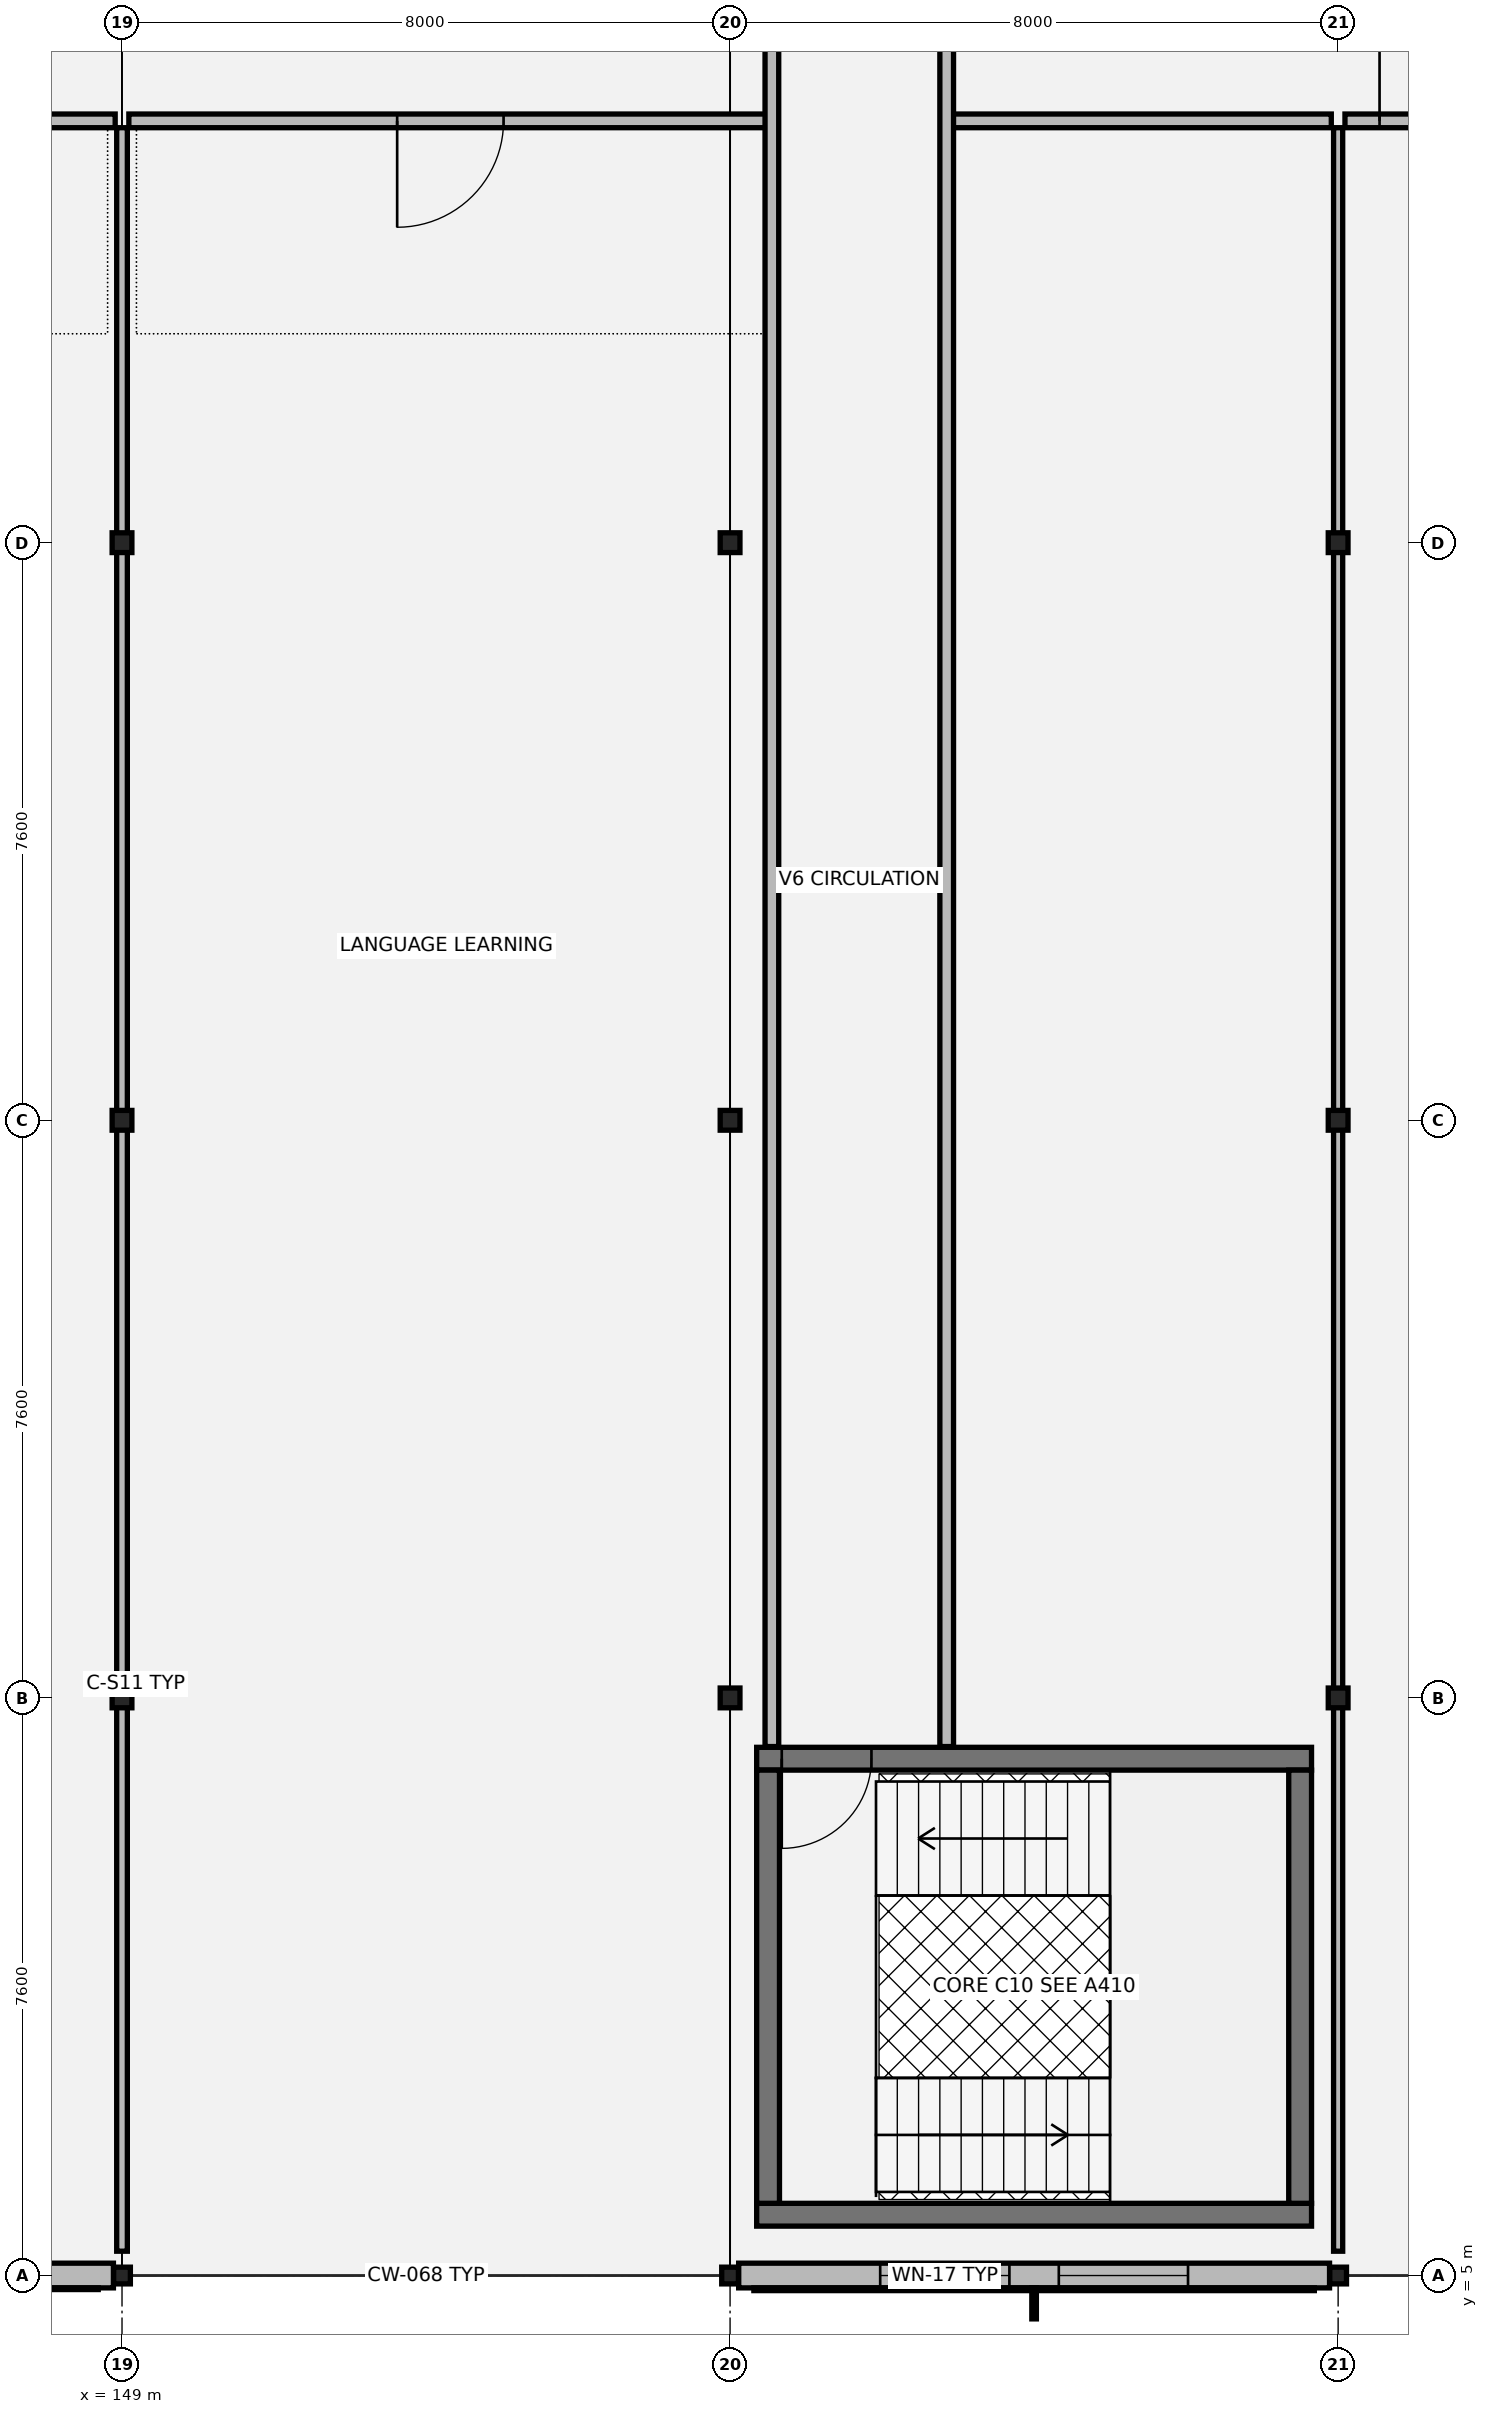
"""IFC4 building model, lengths in metres.
Left out: names, types, materials, properties, quantities, classifications, styles, units other than length and angle.
Written with IfcOpenShell. Run it as: python <this file> out.ifc"""

import sys

from ifc_helpers import new_model, si_unit, direction, frame, frame_2d, origin, origin_2d, place, context, subcontext, project, spatial, rectangle, hollow_rectangle, i_section, extrude, element, fill, save


model = new_model("IFC4")
c1 = context("Model", 3, precision=1e-05, world=origin(), true_north=direction((0.0, 1.0)))
c2 = subcontext(c1, "Body", "Model", "MODEL_VIEW")
j1 = project(units=[si_unit("LENGTHUNIT", "METRE"), si_unit("PLANEANGLEUNIT", "RADIAN")], contexts=[c1])
p1 = place(None, origin())
s1 = spatial("IfcSite", under=j1, at=p1, CompositionType="ELEMENT")
p2 = place(p1, origin())
s2 = spatial("IfcBuilding", under=s1, at=p2, CompositionType="ELEMENT")
p3 = place(p2, frame((0.0, 0.0, 13.26)))
s3 = spatial("IfcBuildingStorey", under=s2, at=p3, CompositionType="ELEMENT", Elevation=13.26)
p4 = place(p3, frame((149.0, 5.0, 0.0), z_axis=(0.0, 0.0, 1.0), x_axis=(1.0, 0.0, 0.0)))
e1 = element("IfcColumn", 1, at=p4, inside=s3, PredefinedType="COLUMN", context=c2, shape_type="SweptSolid", body=[
    extrude(hollow_rectangle(XDim=0.22, YDim=0.22, WallThickness=0.01, at=origin_2d()), origin(), (0.0, 0.0, 1.0), 4.055),
])
for number, where, z_axis, x_axis in (
    (2, (149.0, 12.6, 0.0), (0.0, 0.0, 1.0), (1.0, 0.0, 0.0)),
    (3, (149.0, 20.2, 0.0), (0.0, 0.0, 1.0), (1.0, 0.0, 0.0)),
    (4, (149.0, 27.8, 0.0), (0.0, 0.0, 1.0), (1.0, 0.0, 0.0)),
):
    element("IfcColumn", number, at=place(p3, frame(where, z_axis=z_axis, x_axis=x_axis)), inside=s3, PredefinedType="COLUMN", context=c2, shape_type="SweptSolid", body=[
        extrude(i_section(OverallWidth=0.26, OverallDepth=0.26, WebThickness=0.01, FlangeThickness=0.018, at=origin_2d()), origin(), (0.0, 0.0, 1.0), 4.055),
    ])
p5 = place(p3, frame((157.0, 5.0, 0.0), z_axis=(0.0, 0.0, 1.0), x_axis=(1.0, 0.0, 0.0)))
e5 = element("IfcColumn", 5, at=p5, inside=s3, PredefinedType="COLUMN", context=c2, shape_type="SweptSolid", body=[
    extrude(hollow_rectangle(XDim=0.22, YDim=0.22, WallThickness=0.01, at=origin_2d()), origin(), (0.0, 0.0, 1.0), 4.055),
])
for number, where, z_axis, x_axis in (
    (6, (157.0, 12.6, 0.0), (0.0, 0.0, 1.0), (1.0, 0.0, 0.0)),
    (7, (157.0, 20.2, 0.0), (0.0, 0.0, 1.0), (1.0, 0.0, 0.0)),
    (8, (157.0, 27.8, 0.0), (0.0, 0.0, 1.0), (1.0, 0.0, 0.0)),
):
    element("IfcColumn", number, at=place(p3, frame(where, z_axis=z_axis, x_axis=x_axis)), inside=s3, PredefinedType="COLUMN", context=c2, shape_type="SweptSolid", body=[
        extrude(i_section(OverallWidth=0.26, OverallDepth=0.26, WebThickness=0.01, FlangeThickness=0.018, at=origin_2d()), origin(), (0.0, 0.0, 1.0), 4.055),
    ])
p6 = place(p3, frame((165.0, 5.0, 0.0), z_axis=(0.0, 0.0, 1.0), x_axis=(1.0, 0.0, 0.0)))
e9 = element("IfcColumn", 9, at=p6, inside=s3, PredefinedType="COLUMN", context=c2, shape_type="SweptSolid", body=[
    extrude(hollow_rectangle(XDim=0.22, YDim=0.22, WallThickness=0.01, at=origin_2d()), origin(), (0.0, 0.0, 1.0), 4.055),
])
for number, where, z_axis, x_axis in (
    (10, (165.0, 12.6, 0.0), (0.0, 0.0, 1.0), (1.0, 0.0, 0.0)),
    (11, (165.0, 20.2, 0.0), (0.0, 0.0, 1.0), (1.0, 0.0, 0.0)),
    (12, (165.0, 27.8, 0.0), (0.0, 0.0, 1.0), (1.0, 0.0, 0.0)),
):
    element("IfcColumn", number, at=place(p3, frame(where, z_axis=z_axis, x_axis=x_axis)), inside=s3, PredefinedType="COLUMN", context=c2, shape_type="SweptSolid", body=[
        extrude(i_section(OverallWidth=0.26, OverallDepth=0.26, WebThickness=0.01, FlangeThickness=0.018, at=origin_2d()), origin(), (0.0, 0.0, 1.0), 4.055),
    ])
p7 = place(p3, frame((141.113, 5.0, 0.0), z_axis=(0.0, 0.0, 1.0), x_axis=(1.0, 0.0, 0.0)))
e13 = element("IfcWall", 13, at=p7, inside=s3, PredefinedType="SOLIDWALL", context=c2, shape_type="SweptSolid", body=[
    extrude(rectangle(XDim=7.774, YDim=0.325, at=frame_2d((3.887, 0.0))), origin(), (0.0, 0.0, 1.0), 3.48),
])
p8 = place(p7, frame((1.942, 0.0, 0.8)))
e14 = element("IfcOpeningElement", 14, at=p8, cuts=e13, PredefinedType="OPENING", context=c2, shape_type="SweptSolid", body=[
    extrude(rectangle(XDim=1.62, YDim=2.06, at=frame_2d((0.81, 1.03))), frame((0.0, 0.172, 0.0), z_axis=(0.0, -1.0, 0.0), x_axis=(1.0, 0.0, 0.0)), (0.0, 0.0, 1.0), 0.345),
])
p9 = place(p7, frame((4.212, 0.0, 0.8)))
e15 = element("IfcOpeningElement", 15, at=p9, cuts=e13, PredefinedType="OPENING", context=c2, shape_type="SweptSolid", body=[
    extrude(rectangle(XDim=1.62, YDim=2.06, at=frame_2d((0.81, 1.03))), frame((0.0, 0.172, 0.0), z_axis=(0.0, -1.0, 0.0), x_axis=(1.0, 0.0, 0.0)), (0.0, 0.0, 1.0), 0.345),
])
p10 = place(p3, frame((157.113, 5.0, 0.0), z_axis=(0.0, 0.0, 1.0), x_axis=(1.0, 0.0, 0.0)))
e16 = element("IfcWall", 16, at=p10, inside=s3, PredefinedType="SOLIDWALL", context=c2, shape_type="SweptSolid", body=[
    extrude(rectangle(XDim=7.774, YDim=0.325, at=frame_2d((3.887, 0.0))), origin(), (0.0, 0.0, 1.0), 3.48),
])
p11 = place(p10, frame((1.862, 0.0, 0.8)))
e17 = element("IfcOpeningElement", 17, at=p11, cuts=e16, PredefinedType="OPENING", context=c2, shape_type="SweptSolid", body=[
    extrude(rectangle(XDim=1.7, YDim=2.2, at=frame_2d((0.85, 1.1))), frame((0.0, 0.172, 0.0), z_axis=(0.0, -1.0, 0.0), x_axis=(1.0, 0.0, 0.0)), (0.0, 0.0, 1.0), 0.345),
])
p12 = place(p10, frame((4.212, 0.0, 0.8)))
e18 = element("IfcOpeningElement", 18, at=p12, cuts=e16, PredefinedType="OPENING", context=c2, shape_type="SweptSolid", body=[
    extrude(rectangle(XDim=1.7, YDim=2.2, at=frame_2d((0.85, 1.1))), frame((0.0, 0.172, 0.0), z_axis=(0.0, -1.0, 0.0), x_axis=(1.0, 0.0, 0.0)), (0.0, 0.0, 1.0), 0.345),
])
p13 = place(p3, frame((157.35, 5.8, 0.0), z_axis=(0.0, 0.0, 1.0), x_axis=(1.0, 0.0, 0.0)))
e19 = element("IfcWall", 19, at=p13, inside=s3, PredefinedType="SHEAR", context=c2, shape_type="SweptSolid", body=[
    extrude(rectangle(XDim=7.3, YDim=0.3, at=frame_2d((3.65, 0.0))), origin(), (0.0, 0.0, 1.0), 3.845),
])
p14 = place(p3, frame((157.35, 11.8, 0.0), z_axis=(0.0, 0.0, 1.0), x_axis=(1.0, 0.0, 0.0)))
e20 = element("IfcWall", 20, at=p14, inside=s3, PredefinedType="SHEAR", context=c2, shape_type="SweptSolid", body=[
    extrude(rectangle(XDim=7.3, YDim=0.3, at=frame_2d((3.65, 0.0))), origin(), (0.0, 0.0, 1.0), 3.845),
])
p15 = place(p14, frame((0.33, 0.0, 0.0)))
e21 = element("IfcOpeningElement", 21, at=p15, cuts=e20, PredefinedType="OPENING", context=c2, shape_type="SweptSolid", body=[
    extrude(rectangle(XDim=1.18, YDim=2.18, at=frame_2d((0.59, 1.09))), frame((0.0, 0.16, 0.0), z_axis=(0.0, -1.0, 0.0), x_axis=(1.0, 0.0, 0.0)), (0.0, 0.0, 1.0), 0.32),
])
for number, where, z_axis, x_axis in (
    (22, (157.5, 5.95, 0.0), (0.0, 0.0, 1.0), (0.0, 1.0, 0.0)),
    (23, (164.5, 5.95, 0.0), (0.0, 0.0, 1.0), (0.0, 1.0, 0.0)),
):
    element("IfcWall", number, at=place(p3, frame(where, z_axis=z_axis, x_axis=x_axis)), inside=s3, PredefinedType="SHEAR", context=c2, shape_type="SweptSolid", body=[
        extrude(rectangle(XDim=5.7, YDim=0.3, at=frame_2d((2.85, 0.0))), origin(), (0.0, 0.0, 1.0), 3.845),
    ])
p16 = place(p3, frame((141.2, 33.35, 0.0), z_axis=(0.0, 0.0, 1.0), x_axis=(1.0, 0.0, 0.0)))
e24 = element("IfcWall", 24, at=p16, inside=s3, PredefinedType="PARTITIONING", context=c2, shape_type="SweptSolid", body=[
    extrude(rectangle(XDim=7.71, YDim=0.18, at=frame_2d((3.855, 0.0))), origin(), (0.0, 0.0, 1.0), 3.18),
])
p17 = place(p16, frame((3.055, 0.0, 0.0)))
e25 = element("IfcOpeningElement", 25, at=p17, cuts=e24, PredefinedType="OPENING", context=c2, shape_type="SweptSolid", body=[
    extrude(rectangle(XDim=1.6, YDim=2.25, at=frame_2d((0.8, 1.125))), frame((0.0, 0.1, 0.0), z_axis=(0.0, -1.0, 0.0), x_axis=(1.0, 0.0, 0.0)), (0.0, 0.0, 1.0), 0.2),
])
p18 = place(p3, frame((149.09, 33.35, 0.0), z_axis=(0.0, 0.0, 1.0), x_axis=(1.0, 0.0, 0.0)))
e26 = element("IfcWall", 26, at=p18, inside=s3, PredefinedType="PARTITIONING", context=c2, shape_type="SweptSolid", body=[
    extrude(rectangle(XDim=8.46, YDim=0.18, at=frame_2d((4.23, 0.0))), origin(), (0.0, 0.0, 1.0), 3.18),
])
p19 = place(p18, frame((3.53, 0.0, 0.0)))
e27 = element("IfcOpeningElement", 27, at=p19, cuts=e26, PredefinedType="OPENING", context=c2, shape_type="SweptSolid", body=[
    extrude(rectangle(XDim=1.4, YDim=2.22, at=frame_2d((0.7, 1.11))), frame((0.0, 0.1, 0.0), z_axis=(0.0, -1.0, 0.0), x_axis=(1.0, 0.0, 0.0)), (0.0, 0.0, 1.0), 0.2),
])
p20 = place(p3, frame((159.85, 33.35, 0.0), z_axis=(0.0, 0.0, 1.0), x_axis=(1.0, 0.0, 0.0)))
e28 = element("IfcWall", 28, at=p20, inside=s3, PredefinedType="PARTITIONING", context=c2, shape_type="SweptSolid", body=[
    extrude(rectangle(XDim=5.06, YDim=0.18, at=frame_2d((2.53, 0.0))), origin(), (0.0, 0.0, 1.0), 3.18),
])
p21 = place(p3, frame((165.09, 33.35, 0.0), z_axis=(0.0, 0.0, 1.0), x_axis=(1.0, 0.0, 0.0)))
e29 = element("IfcWall", 29, at=p21, inside=s3, PredefinedType="PARTITIONING", context=c2, shape_type="SweptSolid", body=[
    extrude(rectangle(XDim=2.17, YDim=0.18, at=frame_2d((1.085, 0.0))), origin(), (0.0, 0.0, 1.0), 3.18),
])
p22 = place(p21, frame((0.455, 0.0, 0.0)))
e30 = element("IfcOpeningElement", 30, at=p22, cuts=e29, PredefinedType="OPENING", context=c2, shape_type="SweptSolid", body=[
    extrude(rectangle(XDim=1.26, YDim=2.2, at=frame_2d((0.63, 1.1))), frame((0.0, 0.1, 0.0), z_axis=(0.0, -1.0, 0.0), x_axis=(1.0, 0.0, 0.0)), (0.0, 0.0, 1.0), 0.2),
])
for number, where, z_axis, x_axis in (
    (31, (157.55, 11.96, 0.0), (0.0, 0.0, 1.0), (0.0, 1.0, 0.0)),
    (32, (159.85, 11.96, 0.0), (0.0, 0.0, 1.0), (0.0, 1.0, 0.0)),
):
    element("IfcWall", number, at=place(p3, frame(where, z_axis=z_axis, x_axis=x_axis)), inside=s3, PredefinedType="PARTITIONING", context=c2, shape_type="SweptSolid", body=[
        extrude(rectangle(XDim=24.08, YDim=0.18, at=frame_2d((12.04, 0.0))), origin(), (0.0, 0.0, 1.0), 3.18),
    ])
p23 = place(p3, frame((149.0, 5.32, 0.0), z_axis=(0.0, 0.0, 1.0), x_axis=(0.0, 1.0, 0.0)))
e33 = element("IfcWall", 33, at=p23, inside=s3, PredefinedType="PARTITIONING", context=c2, shape_type="SweptSolid", body=[
    extrude(rectangle(XDim=27.94, YDim=0.14, at=frame_2d((13.97, 0.0))), origin(), (0.0, 0.0, 1.0), 3.18),
])
p24 = place(p3, frame((165.0, 5.32, 0.0), z_axis=(0.0, 0.0, 1.0), x_axis=(0.0, 1.0, 0.0)))
e34 = element("IfcWall", 34, at=p24, inside=s3, PredefinedType="PARTITIONING", context=c2, shape_type="SweptSolid", body=[
    extrude(rectangle(XDim=27.94, YDim=0.12, at=frame_2d((13.97, 0.0))), origin(), (0.0, 0.0, 1.0), 3.18),
])
p25 = place(p11, origin())
e35 = element("IfcWindow", 35, at=p25, inside=s3, PartitioningType="SINGLE_PANEL", PredefinedType="WINDOW", context=c2, shape_type="SweptSolid", body=[
    extrude(rectangle(XDim=1.7, YDim=2.2, at=frame_2d((0.85, 1.1))), frame((0.0, 0.03, 0.0), z_axis=(0.0, -1.0, 0.0), x_axis=(1.0, 0.0, 0.0)), (0.0, 0.0, 1.0), 0.06),
])
fill(e17, e35)
p26 = place(p12, origin())
e36 = element("IfcWindow", 36, at=p26, inside=s3, PartitioningType="SINGLE_PANEL", PredefinedType="WINDOW", context=c2, shape_type="SweptSolid", body=[
    extrude(rectangle(XDim=1.7, YDim=2.2, at=frame_2d((0.85, 1.1))), frame((0.0, 0.03, 0.0), z_axis=(0.0, -1.0, 0.0), x_axis=(1.0, 0.0, 0.0)), (0.0, 0.0, 1.0), 0.06),
])
fill(e18, e36)
p27 = place(p15, origin())
e37 = element("IfcDoor", 37, at=p27, inside=s3, OperationType="SINGLE_SWING_RIGHT", PredefinedType="DOOR", context=c2, shape_type="SweptSolid", body=[
    extrude(rectangle(XDim=1.18, YDim=2.18, at=frame_2d((0.59, 1.09))), frame((0.0, 0.025, 0.0), z_axis=(0.0, -1.0, 0.0), x_axis=(1.0, 0.0, 0.0)), (0.0, 0.0, 1.0), 0.05),
])
fill(e21, e37)
p28 = place(p19, origin())
e38 = element("IfcDoor", 38, at=p28, inside=s3, OperationType="SINGLE_SWING_RIGHT", PredefinedType="DOOR", context=c2, shape_type="SweptSolid", body=[
    extrude(rectangle(XDim=1.4, YDim=2.22, at=frame_2d((0.7, 1.11))), frame((0.0, 0.025, 0.0), z_axis=(0.0, -1.0, 0.0), x_axis=(1.0, 0.0, 0.0)), (0.0, 0.0, 1.0), 0.05),
])
fill(e27, e38)
p29 = place(p22, origin())
e39 = element("IfcDoor", 39, at=p29, inside=s3, OperationType="SINGLE_SWING_LEFT", PredefinedType="DOOR", context=c2, shape_type="SweptSolid", body=[
    extrude(rectangle(XDim=1.26, YDim=2.2, at=frame_2d((0.63, 1.1))), frame((0.0, 0.025, 0.0), z_axis=(0.0, -1.0, 0.0), x_axis=(1.0, 0.0, 0.0)), (0.0, 0.0, 1.0), 0.05),
])
fill(e30, e39)
save(model, sys.argv[1])
